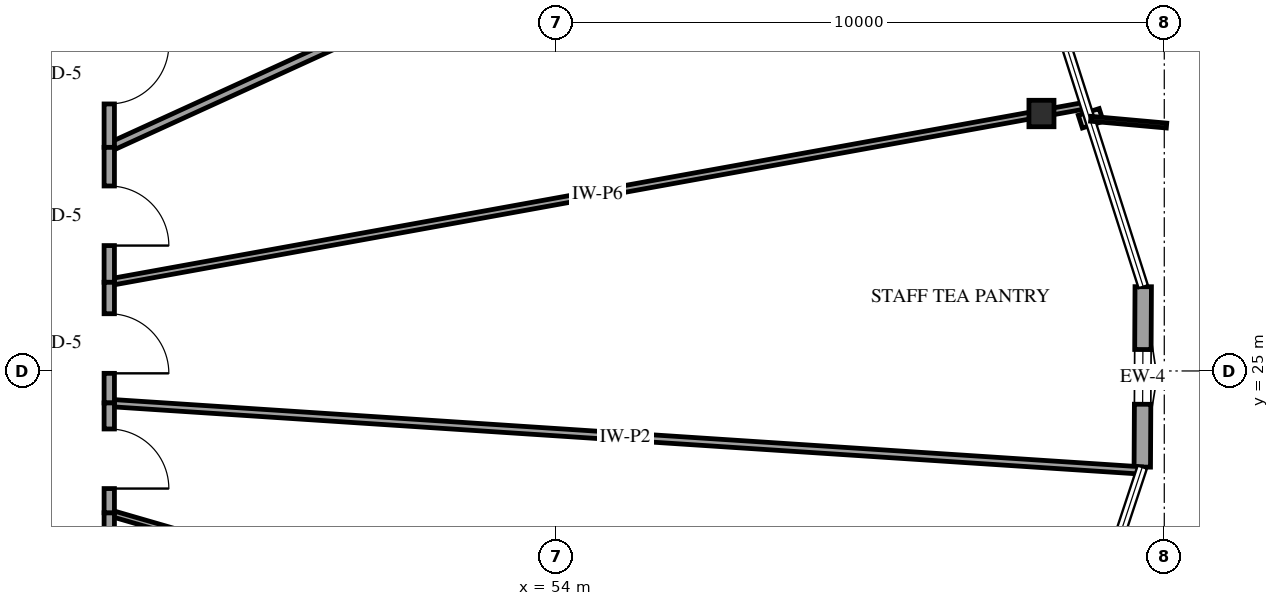
"""IFC4 building model, lengths in metres.
Left out: names, types, materials, properties, quantities, classifications, styles, units other than length and angle.
Written with IfcOpenShell. Run it as: python <this file> out.ifc"""

import sys

from ifc_helpers import new_model, si_unit, direction, frame, frame_2d, origin, origin_2d, place, context, subcontext, project, spatial, rectangle, i_section, extrude, element, fill, save


model = new_model("IFC4")
c1 = context("Model", 3, precision=1e-05, world=origin(), true_north=direction((0.0, 1.0)))
c2 = subcontext(c1, "Body", "Model", "MODEL_VIEW")
j1 = project(units=[si_unit("LENGTHUNIT", "METRE"), si_unit("PLANEANGLEUNIT", "RADIAN")], contexts=[c1])
p1 = place(None, origin())
s1 = spatial("IfcSite", under=j1, at=p1, CompositionType="ELEMENT")
p2 = place(p1, origin())
s2 = spatial("IfcBuilding", under=s1, at=p2, CompositionType="ELEMENT")
p3 = place(p2, frame((0.0, 0.0, 164.2)))
s3 = spatial("IfcBuildingStorey", under=s2, at=p3, CompositionType="ELEMENT", Elevation=164.2)
p4 = place(p3, frame((61.98, 29.234, 0.0), z_axis=(0.0, 0.0, 1.0), x_axis=(1.0, 0.0, 0.0)))
e1 = element("IfcColumn", 1, at=p4, inside=s3, PredefinedType="COLUMN", context=c2, shape_type="SweptSolid", body=[
    extrude(i_section(OverallWidth=0.412, OverallDepth=0.435, WebThickness=0.036, FlangeThickness=0.057, FilletRadius=0.038, at=origin_2d()), origin(), (0.0, 0.0, 1.0), 3.6),
])
p5 = place(p3, frame((63.638, 23.419, 0.0), z_axis=(0.0, 0.0, 1.0), x_axis=(0.005267416636, 0.999986127065, 0.0)))
e2 = element("IfcWall", 2, at=p5, inside=s3, PredefinedType="SOLIDWALL", context=c2, shape_type="SweptSolid", body=[
    extrude(rectangle(XDim=2.966, YDim=0.27, at=frame_2d((1.483, 0.0))), origin(), (0.0, 0.0, 1.0), 2.679),
])
p6 = place(p5, frame((1.033, 0.0, 0.75)))
e3 = element("IfcOpeningElement", 3, at=p6, cuts=e2, PredefinedType="OPENING", context=c2, shape_type="SweptSolid", body=[
    extrude(rectangle(XDim=0.9, YDim=1.5, at=frame_2d((0.45, 0.75))), frame((0.0, 0.145, 0.0), z_axis=(0.0, -1.0, 0.0), x_axis=(1.0, 0.0, 0.0)), (0.0, 0.0, 1.0), 0.29),
])
p7 = place(p3, frame((63.62, 23.364, 0.0), z_axis=(0.0, 0.0, 1.0), x_axis=(-0.997867277943, 0.065275536078, 0.0)))
e4 = element("IfcWall", 4, at=p7, inside=s3, PredefinedType="PARTITIONING", context=c2, shape_type="SweptSolid", body=[
    extrude(rectangle(XDim=17.007, YDim=0.12, at=frame_2d((8.503, 0.0))), origin(), (0.0, 0.0, 1.0), 3.3),
])
p8 = place(p3, frame((46.65, 26.458, 0.0), z_axis=(0.0, 0.0, 1.0), x_axis=(0.983996327564, 0.178188740777, 0.0)))
e5 = element("IfcWall", 5, at=p8, inside=s3, PredefinedType="PARTITIONING", context=c2, shape_type="SweptSolid", body=[
    extrude(rectangle(XDim=16.314, YDim=0.11, at=frame_2d((8.157, 0.0))), origin(), (0.0, 0.0, 1.0), 2.595),
])
p9 = place(p3, frame((46.65, 22.668, 0.0), z_axis=(0.0, 0.0, 1.0), x_axis=(0.960497233725, -0.278289532694, 0.0)))
e6 = element("IfcWall", 6, at=p9, inside=s3, PredefinedType="PARTITIONING", context=c2, shape_type="SweptSolid", body=[
    extrude(rectangle(XDim=15.904, YDim=0.1, at=frame_2d((7.952, 0.0))), origin(), (0.0, 0.0, 1.0), 3.3),
])
p10 = place(p3, frame((46.65, 28.677, 0.0), z_axis=(0.0, 0.0, 1.0), x_axis=(0.909570894807, 0.41554877851, 0.0)))
e7 = element("IfcWall", 7, at=p10, inside=s3, PredefinedType="PARTITIONING", context=c2, shape_type="SweptSolid", body=[
    extrude(rectangle(XDim=15.534, YDim=0.14, at=frame_2d((7.767, 0.0))), origin(), (0.0, 0.0, 1.0), 3.3),
])
p11 = place(p3, frame((46.65, 31.115, 0.0), z_axis=(0.0, 0.0, 1.0), x_axis=(0.0, -1.0, 0.0)))
e8 = element("IfcWall", 8, at=p11, inside=s3, PredefinedType="PARTITIONING", context=c2, shape_type="SweptSolid", body=[
    extrude(rectangle(XDim=2.438, YDim=0.17, at=frame_2d((1.219, 0.0))), origin(), (0.0, 0.0, 1.0), 3.3),
])
p12 = place(p11, frame((0.744, 0.0, 0.0)))
e9 = element("IfcOpeningElement", 9, at=p12, cuts=e8, PredefinedType="OPENING", context=c2, shape_type="SweptSolid", body=[
    extrude(rectangle(XDim=0.98, YDim=2.15, at=frame_2d((0.49, 1.075))), frame((0.0, 0.095, 0.0), z_axis=(0.0, -1.0, 0.0), x_axis=(1.0, 0.0, 0.0)), (0.0, 0.0, 1.0), 0.19),
])
p13 = place(p3, frame((46.65, 28.677, 0.0), z_axis=(0.0, 0.0, 1.0), x_axis=(0.0, -1.0, 0.0)))
e10 = element("IfcWall", 10, at=p13, inside=s3, PredefinedType="PARTITIONING", context=c2, shape_type="SweptSolid", body=[
    extrude(rectangle(XDim=2.219, YDim=0.17, at=frame_2d((1.109, 0.0))), origin(), (0.0, 0.0, 1.0), 3.3),
])
p14 = place(p13, frame((0.635, 0.0, 0.0)))
e11 = element("IfcOpeningElement", 11, at=p14, cuts=e10, PredefinedType="OPENING", context=c2, shape_type="SweptSolid", body=[
    extrude(rectangle(XDim=0.98, YDim=2.15, at=frame_2d((0.49, 1.075))), frame((0.0, 0.095, 0.0), z_axis=(0.0, -1.0, 0.0), x_axis=(1.0, 0.0, 0.0)), (0.0, 0.0, 1.0), 0.19),
])
p15 = place(p3, frame((46.65, 22.668, 0.0), z_axis=(0.0, 0.0, 1.0), x_axis=(0.0, -1.0, 0.0)))
e12 = element("IfcWall", 12, at=p15, inside=s3, PredefinedType="PARTITIONING", context=c2, shape_type="SweptSolid", body=[
    extrude(rectangle(XDim=2.126, YDim=0.17, at=frame_2d((1.063, 0.0))), origin(), (0.0, 0.0, 1.0), 3.3),
])
p16 = place(p15, frame((0.588, 0.0, 0.0)))
e13 = element("IfcOpeningElement", 13, at=p16, cuts=e12, PredefinedType="OPENING", context=c2, shape_type="SweptSolid", body=[
    extrude(rectangle(XDim=0.98, YDim=2.15, at=frame_2d((0.49, 1.075))), frame((0.0, 0.095, 0.0), z_axis=(0.0, -1.0, 0.0), x_axis=(1.0, 0.0, 0.0)), (0.0, 0.0, 1.0), 0.19),
])
p17 = place(p3, frame((46.65, 26.458, 0.0), z_axis=(0.0, 0.0, 1.0), x_axis=(0.0, -1.0, 0.0)))
e14 = element("IfcWall", 14, at=p17, inside=s3, PredefinedType="PARTITIONING", context=c2, shape_type="SweptSolid", body=[
    extrude(rectangle(XDim=1.984, YDim=0.17, at=frame_2d((0.992, 0.0))), origin(), (0.0, 0.0, 1.0), 3.3),
])
p18 = place(p17, frame((0.517, 0.0, 0.0)))
e15 = element("IfcOpeningElement", 15, at=p18, cuts=e14, PredefinedType="OPENING", context=c2, shape_type="SweptSolid", body=[
    extrude(rectangle(XDim=0.98, YDim=2.15, at=frame_2d((0.49, 1.075))), frame((0.0, 0.095, 0.0), z_axis=(0.0, -1.0, 0.0), x_axis=(1.0, 0.0, 0.0)), (0.0, 0.0, 1.0), 0.19),
])
p19 = place(p3, frame((46.65, 24.474, 0.0), z_axis=(0.0, 0.0, 1.0), x_axis=(0.0, -1.0, 0.0)))
e16 = element("IfcWall", 16, at=p19, inside=s3, PredefinedType="PARTITIONING", context=c2, shape_type="SweptSolid", body=[
    extrude(rectangle(XDim=1.806, YDim=0.17, at=frame_2d((0.903, 0.0))), origin(), (0.0, 0.0, 1.0), 3.3),
])
p20 = place(p19, frame((0.428, 0.0, 0.0)))
e17 = element("IfcOpeningElement", 17, at=p20, cuts=e16, PredefinedType="OPENING", context=c2, shape_type="SweptSolid", body=[
    extrude(rectangle(XDim=0.98, YDim=2.15, at=frame_2d((0.49, 1.075))), frame((0.0, 0.095, 0.0), z_axis=(0.0, -1.0, 0.0), x_axis=(1.0, 0.0, 0.0)), (0.0, 0.0, 1.0), 0.19),
])
p21 = place(p6, origin())
e18 = element("IfcWindow", 18, at=p21, inside=s3, PartitioningType="SINGLE_PANEL", PredefinedType="WINDOW", context=c2, shape_type="SweptSolid", body=[
    extrude(rectangle(XDim=0.9, YDim=1.5, at=frame_2d((0.45, 0.75))), frame((0.0, 0.03, 0.0), z_axis=(0.0, -1.0, 0.0), x_axis=(1.0, 0.0, 0.0)), (0.0, 0.0, 1.0), 0.06),
])
fill(e3, e18)
p22 = place(p12, origin())
e19 = element("IfcDoor", 19, at=p22, inside=s3, OperationType="SINGLE_SWING_LEFT", PredefinedType="DOOR", context=c2, shape_type="SweptSolid", body=[
    extrude(rectangle(XDim=0.98, YDim=2.15, at=frame_2d((0.49, 1.075))), frame((0.0, 0.025, 0.0), z_axis=(0.0, -1.0, 0.0), x_axis=(1.0, 0.0, 0.0)), (0.0, 0.0, 1.0), 0.05),
])
fill(e9, e19)
p23 = place(p14, origin())
e20 = element("IfcDoor", 20, at=p23, inside=s3, OperationType="SINGLE_SWING_RIGHT", PredefinedType="DOOR", context=c2, shape_type="SweptSolid", body=[
    extrude(rectangle(XDim=0.98, YDim=2.15, at=frame_2d((0.49, 1.075))), frame((0.0, 0.025, 0.0), z_axis=(0.0, -1.0, 0.0), x_axis=(1.0, 0.0, 0.0)), (0.0, 0.0, 1.0), 0.05),
])
fill(e11, e20)
p24 = place(p18, origin())
e21 = element("IfcDoor", 21, at=p24, inside=s3, OperationType="SINGLE_SWING_RIGHT", PredefinedType="DOOR", context=c2, shape_type="SweptSolid", body=[
    extrude(rectangle(XDim=0.98, YDim=2.15, at=frame_2d((0.49, 1.075))), frame((0.0, 0.025, 0.0), z_axis=(0.0, -1.0, 0.0), x_axis=(1.0, 0.0, 0.0)), (0.0, 0.0, 1.0), 0.05),
])
fill(e15, e21)
p25 = place(p20, origin())
e22 = element("IfcDoor", 22, at=p25, inside=s3, OperationType="SINGLE_SWING_RIGHT", PredefinedType="DOOR", context=c2, shape_type="SweptSolid", body=[
    extrude(rectangle(XDim=0.98, YDim=2.15, at=frame_2d((0.49, 1.075))), frame((0.0, 0.025, 0.0), z_axis=(0.0, -1.0, 0.0), x_axis=(1.0, 0.0, 0.0)), (0.0, 0.0, 1.0), 0.05),
])
fill(e17, e22)
save(model, sys.argv[1])
